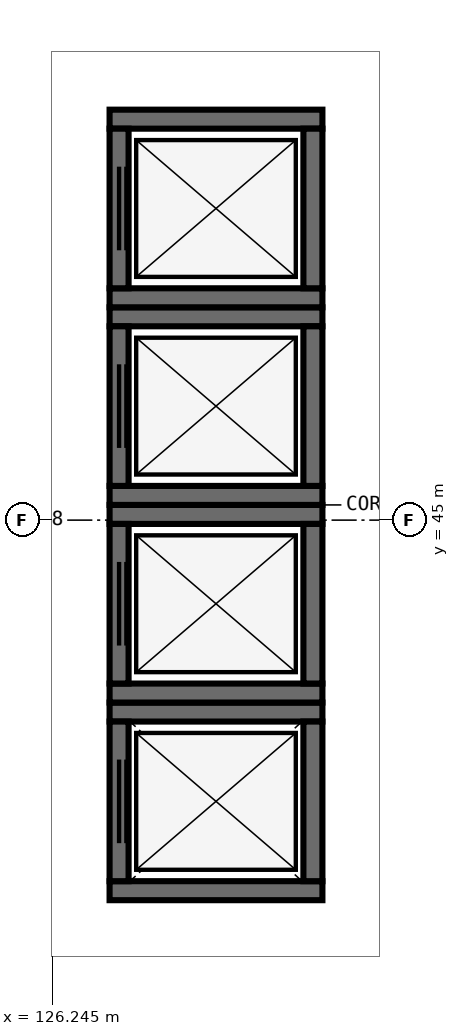
"""IFC4 building model, lengths in metres.
Left out: names, types, materials, properties, quantities, classifications, styles, units other than length and angle.
Written with IfcOpenShell. Run it as: python <this file> out.ifc"""

import sys

from ifc_helpers import new_model, si_unit, direction, frame, frame_2d, origin, place, context, subcontext, project, spatial, rectangle, extrude, element, fill, save


model = new_model("IFC4")
c1 = context("Model", 3, precision=1e-05, world=origin(), true_north=direction((0.0, 1.0)))
c2 = subcontext(c1, "Body", "Model", "MODEL_VIEW")
j1 = project(units=[si_unit("LENGTHUNIT", "METRE"), si_unit("PLANEANGLEUNIT", "RADIAN")], contexts=[c1])
p1 = place(None, origin())
s1 = spatial("IfcSite", under=j1, at=p1, CompositionType="ELEMENT")
p2 = place(p1, origin())
s2 = spatial("IfcBuilding", under=s1, at=p2, CompositionType="ELEMENT")
p3 = place(p2, frame((0.0, 0.0, 6.0)))
s3 = spatial("IfcBuildingStorey", under=s2, at=p3, CompositionType="ELEMENT", Elevation=6.0)
for number, where, z_axis, x_axis in (
    (1, (127.0, 40.125, 0.0), (0.0, 0.0, 1.0), (1.0, 0.0, 0.0)),
    (2, (129.8, 42.475, 0.0), (0.0, 0.0, 1.0), (-1.0, 0.0, 0.0)),
):
    element("IfcWall", number, at=place(p3, frame(where, z_axis=z_axis, x_axis=x_axis)), inside=s3, PredefinedType="SHEAR", context=c2, shape_type="SweptSolid", body=[
        extrude(rectangle(XDim=2.8, YDim=0.25, at=frame_2d((1.4, 0.0))), origin(), (0.0, 0.0, 1.0), 6.0),
    ])
p4 = place(p3, frame((127.125, 42.35, 0.0), z_axis=(0.0, 0.0, 1.0), x_axis=(0.0, -1.0, 0.0)))
e3 = element("IfcWall", 3, at=p4, inside=s3, PredefinedType="SHEAR", context=c2, shape_type="SweptSolid", body=[
    extrude(rectangle(XDim=2.1, YDim=0.25, at=frame_2d((1.05, 0.0))), origin(), (0.0, 0.0, 1.0), 6.0),
])
p5 = place(p4, frame((0.5, 0.0, 0.0)))
e4 = element("IfcOpeningElement", 4, at=p5, cuts=e3, PredefinedType="OPENING", context=c2, shape_type="SweptSolid", body=[
    extrude(rectangle(XDim=1.1, YDim=2.2, at=frame_2d((0.55, 1.1))), frame((0.0, 0.14, 0.0), z_axis=(0.0, -1.0, 0.0), x_axis=(1.0, 0.0, 0.0)), (0.0, 0.0, 1.0), 0.28),
])
p6 = place(p3, frame((129.675, 40.25, 0.0), z_axis=(0.0, 0.0, 1.0), x_axis=(0.0, 1.0, 0.0)))
e5 = element("IfcWall", 5, at=p6, inside=s3, PredefinedType="SHEAR", context=c2, shape_type="SweptSolid", body=[
    extrude(rectangle(XDim=2.1, YDim=0.25, at=frame_2d((1.05, 0.0))), origin(), (0.0, 0.0, 1.0), 6.0),
])
for number, where, z_axis, x_axis in (
    (6, (127.0, 42.725, 0.0), (0.0, 0.0, 1.0), (1.0, 0.0, 0.0)),
    (7, (129.8, 45.075, 0.0), (0.0, 0.0, 1.0), (-1.0, 0.0, 0.0)),
):
    element("IfcWall", number, at=place(p3, frame(where, z_axis=z_axis, x_axis=x_axis)), inside=s3, PredefinedType="SHEAR", context=c2, shape_type="SweptSolid", body=[
        extrude(rectangle(XDim=2.8, YDim=0.25, at=frame_2d((1.4, 0.0))), origin(), (0.0, 0.0, 1.0), 6.0),
    ])
p7 = place(p3, frame((127.125, 44.95, 0.0), z_axis=(0.0, 0.0, 1.0), x_axis=(0.0, -1.0, 0.0)))
e8 = element("IfcWall", 8, at=p7, inside=s3, PredefinedType="SHEAR", context=c2, shape_type="SweptSolid", body=[
    extrude(rectangle(XDim=2.1, YDim=0.25, at=frame_2d((1.05, 0.0))), origin(), (0.0, 0.0, 1.0), 6.0),
])
p8 = place(p7, frame((0.5, 0.0, 0.0)))
e9 = element("IfcOpeningElement", 9, at=p8, cuts=e8, PredefinedType="OPENING", context=c2, shape_type="SweptSolid", body=[
    extrude(rectangle(XDim=1.1, YDim=2.2, at=frame_2d((0.55, 1.1))), frame((0.0, 0.14, 0.0), z_axis=(0.0, -1.0, 0.0), x_axis=(1.0, 0.0, 0.0)), (0.0, 0.0, 1.0), 0.28),
])
p9 = place(p3, frame((129.675, 42.85, 0.0), z_axis=(0.0, 0.0, 1.0), x_axis=(0.0, 1.0, 0.0)))
e10 = element("IfcWall", 10, at=p9, inside=s3, PredefinedType="SHEAR", context=c2, shape_type="SweptSolid", body=[
    extrude(rectangle(XDim=2.1, YDim=0.25, at=frame_2d((1.05, 0.0))), origin(), (0.0, 0.0, 1.0), 6.0),
])
for number, where, z_axis, x_axis in (
    (11, (127.0, 45.325, 0.0), (0.0, 0.0, 1.0), (1.0, 0.0, 0.0)),
    (12, (129.8, 47.675, 0.0), (0.0, 0.0, 1.0), (-1.0, 0.0, 0.0)),
):
    element("IfcWall", number, at=place(p3, frame(where, z_axis=z_axis, x_axis=x_axis)), inside=s3, PredefinedType="SHEAR", context=c2, shape_type="SweptSolid", body=[
        extrude(rectangle(XDim=2.8, YDim=0.25, at=frame_2d((1.4, 0.0))), origin(), (0.0, 0.0, 1.0), 6.0),
    ])
p10 = place(p3, frame((127.125, 47.55, 0.0), z_axis=(0.0, 0.0, 1.0), x_axis=(0.0, -1.0, 0.0)))
e13 = element("IfcWall", 13, at=p10, inside=s3, PredefinedType="SHEAR", context=c2, shape_type="SweptSolid", body=[
    extrude(rectangle(XDim=2.1, YDim=0.25, at=frame_2d((1.05, 0.0))), origin(), (0.0, 0.0, 1.0), 6.0),
])
p11 = place(p10, frame((0.5, 0.0, 0.0)))
e14 = element("IfcOpeningElement", 14, at=p11, cuts=e13, PredefinedType="OPENING", context=c2, shape_type="SweptSolid", body=[
    extrude(rectangle(XDim=1.1, YDim=2.2, at=frame_2d((0.55, 1.1))), frame((0.0, 0.14, 0.0), z_axis=(0.0, -1.0, 0.0), x_axis=(1.0, 0.0, 0.0)), (0.0, 0.0, 1.0), 0.28),
])
p12 = place(p3, frame((129.675, 45.45, 0.0), z_axis=(0.0, 0.0, 1.0), x_axis=(0.0, 1.0, 0.0)))
e15 = element("IfcWall", 15, at=p12, inside=s3, PredefinedType="SHEAR", context=c2, shape_type="SweptSolid", body=[
    extrude(rectangle(XDim=2.1, YDim=0.25, at=frame_2d((1.05, 0.0))), origin(), (0.0, 0.0, 1.0), 6.0),
])
for number, where, z_axis, x_axis in (
    (16, (127.0, 47.925, 0.0), (0.0, 0.0, 1.0), (1.0, 0.0, 0.0)),
    (17, (129.8, 50.275, 0.0), (0.0, 0.0, 1.0), (-1.0, 0.0, 0.0)),
):
    element("IfcWall", number, at=place(p3, frame(where, z_axis=z_axis, x_axis=x_axis)), inside=s3, PredefinedType="SHEAR", context=c2, shape_type="SweptSolid", body=[
        extrude(rectangle(XDim=2.8, YDim=0.25, at=frame_2d((1.4, 0.0))), origin(), (0.0, 0.0, 1.0), 6.0),
    ])
p13 = place(p3, frame((127.125, 50.15, 0.0), z_axis=(0.0, 0.0, 1.0), x_axis=(0.0, -1.0, 0.0)))
e18 = element("IfcWall", 18, at=p13, inside=s3, PredefinedType="SHEAR", context=c2, shape_type="SweptSolid", body=[
    extrude(rectangle(XDim=2.1, YDim=0.25, at=frame_2d((1.05, 0.0))), origin(), (0.0, 0.0, 1.0), 6.0),
])
p14 = place(p13, frame((0.5, 0.0, 0.0)))
e19 = element("IfcOpeningElement", 19, at=p14, cuts=e18, PredefinedType="OPENING", context=c2, shape_type="SweptSolid", body=[
    extrude(rectangle(XDim=1.1, YDim=2.2, at=frame_2d((0.55, 1.1))), frame((0.0, 0.14, 0.0), z_axis=(0.0, -1.0, 0.0), x_axis=(1.0, 0.0, 0.0)), (0.0, 0.0, 1.0), 0.28),
])
p15 = place(p3, frame((129.675, 48.05, 0.0), z_axis=(0.0, 0.0, 1.0), x_axis=(0.0, 1.0, 0.0)))
e20 = element("IfcWall", 20, at=p15, inside=s3, PredefinedType="SHEAR", context=c2, shape_type="SweptSolid", body=[
    extrude(rectangle(XDim=2.1, YDim=0.25, at=frame_2d((1.05, 0.0))), origin(), (0.0, 0.0, 1.0), 6.0),
])
p16 = place(p5, origin())
e21 = element("IfcDoor", 21, at=p16, inside=s3, OperationType="DOUBLE_DOOR_SLIDING", PredefinedType="DOOR", context=c2, shape_type="SweptSolid", body=[
    extrude(rectangle(XDim=1.1, YDim=2.2, at=frame_2d((0.55, 1.1))), frame((0.0, 0.025, 0.0), z_axis=(0.0, -1.0, 0.0), x_axis=(1.0, 0.0, 0.0)), (0.0, 0.0, 1.0), 0.05),
])
fill(e4, e21)
p17 = place(p8, origin())
e22 = element("IfcDoor", 22, at=p17, inside=s3, OperationType="DOUBLE_DOOR_SLIDING", PredefinedType="DOOR", context=c2, shape_type="SweptSolid", body=[
    extrude(rectangle(XDim=1.1, YDim=2.2, at=frame_2d((0.55, 1.1))), frame((0.0, 0.025, 0.0), z_axis=(0.0, -1.0, 0.0), x_axis=(1.0, 0.0, 0.0)), (0.0, 0.0, 1.0), 0.05),
])
fill(e9, e22)
p18 = place(p11, origin())
e23 = element("IfcDoor", 23, at=p18, inside=s3, OperationType="DOUBLE_DOOR_SLIDING", PredefinedType="DOOR", context=c2, shape_type="SweptSolid", body=[
    extrude(rectangle(XDim=1.1, YDim=2.2, at=frame_2d((0.55, 1.1))), frame((0.0, 0.025, 0.0), z_axis=(0.0, -1.0, 0.0), x_axis=(1.0, 0.0, 0.0)), (0.0, 0.0, 1.0), 0.05),
])
fill(e14, e23)
p19 = place(p14, origin())
e24 = element("IfcDoor", 24, at=p19, inside=s3, OperationType="DOUBLE_DOOR_SLIDING", PredefinedType="DOOR", context=c2, shape_type="SweptSolid", body=[
    extrude(rectangle(XDim=1.1, YDim=2.2, at=frame_2d((0.55, 1.1))), frame((0.0, 0.025, 0.0), z_axis=(0.0, -1.0, 0.0), x_axis=(1.0, 0.0, 0.0)), (0.0, 0.0, 1.0), 0.05),
])
fill(e19, e24)
save(model, sys.argv[1])
